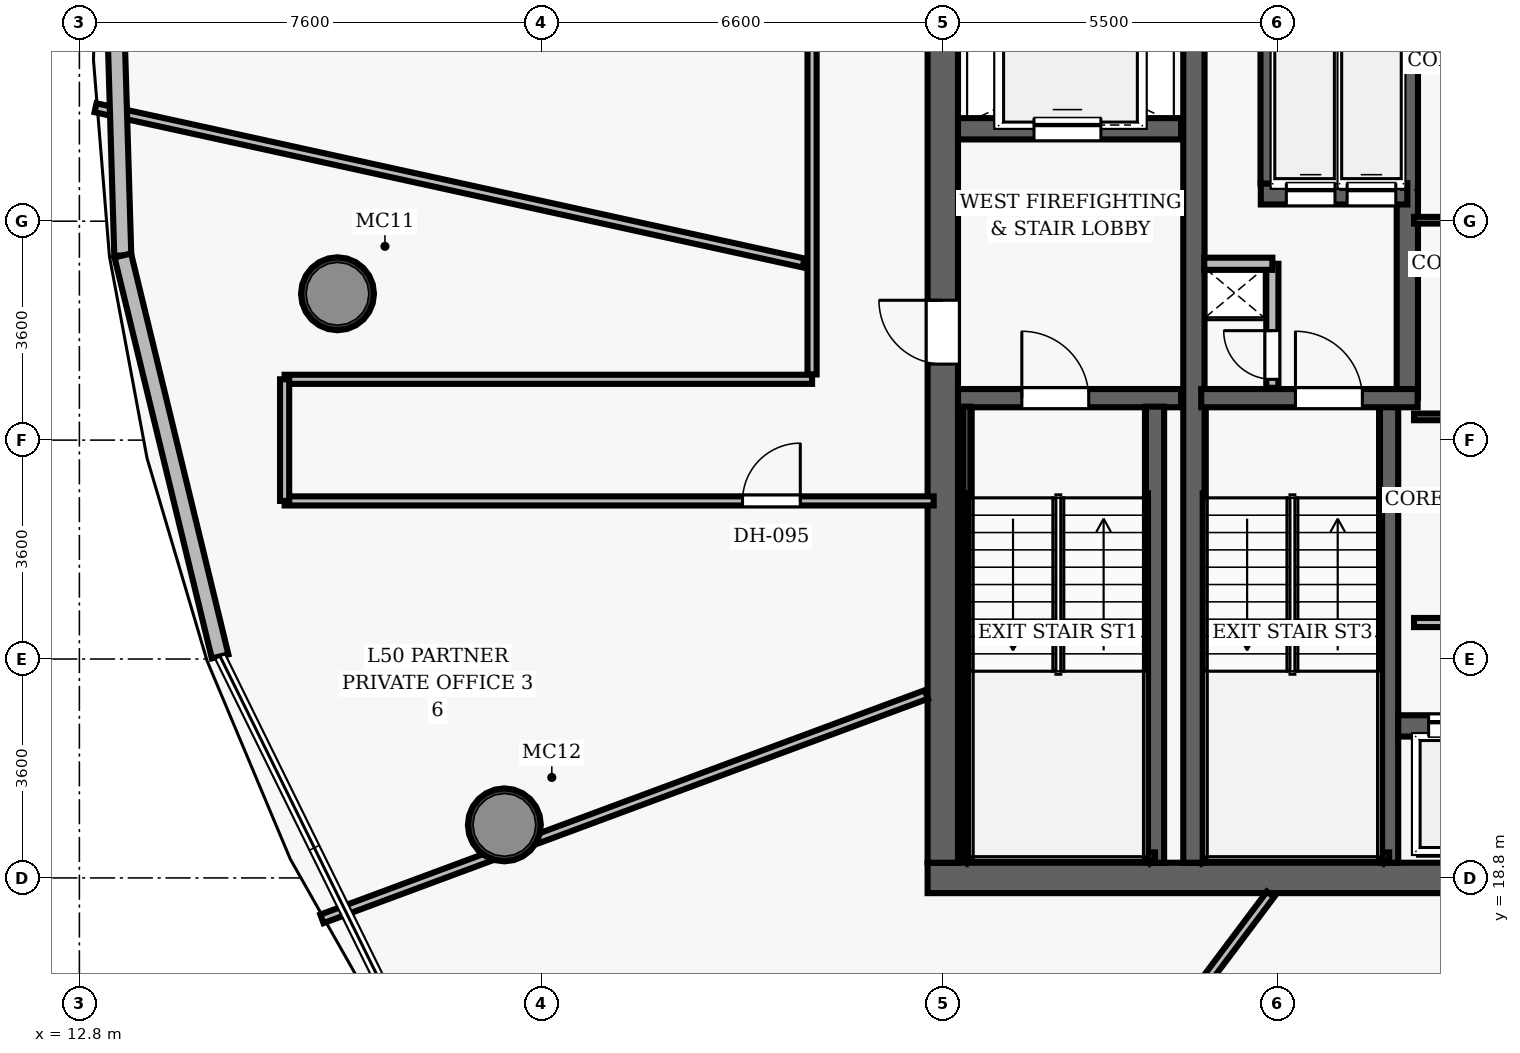
"""IFC4 building model, lengths in metres.
Left out: names, types, materials, properties, quantities, classifications, styles, units other than length and angle.
Written with IfcOpenShell. Run it as: python <this file> out.ifc"""

import sys

from ifc_helpers import new_model, si_unit, direction, frame, frame_2d, origin, origin_2d, place, context, subcontext, project, spatial, rectangle, hollow_circle, extrude, element, fill, save


model = new_model("IFC4")
c1 = context("Model", 3, precision=1e-05, world=origin(), true_north=direction((0.0, 1.0)))
c2 = subcontext(c1, "Body", "Model", "MODEL_VIEW")
j1 = project(units=[si_unit("LENGTHUNIT", "METRE"), si_unit("PLANEANGLEUNIT", "RADIAN")], contexts=[c1])
p1 = place(None, origin())
s1 = spatial("IfcSite", under=j1, at=p1, CompositionType="ELEMENT")
p2 = place(p1, origin())
s2 = spatial("IfcBuilding", under=s1, at=p2, CompositionType="ELEMENT")
p3 = place(p2, frame((0.0, 0.0, 198.15)))
s3 = spatial("IfcBuildingStorey", under=s2, at=p3, CompositionType="ELEMENT", Elevation=198.15)
p4 = place(p3, frame((26.75, 18.8, 0.0), z_axis=(0.0, 0.0, 1.0), x_axis=(1.0, 0.0, 0.0)))
e1 = element("IfcWall", 1, at=p4, inside=s3, PredefinedType="SHEAR", context=c2, shape_type="SweptSolid", body=[
    extrude(rectangle(XDim=22.5, YDim=0.5, at=frame_2d((11.25, 0.0))), origin(), (0.0, 0.0, 1.0), 3.85),
])
p5 = place(p4, frame((14.47, 0.0, 0.0)))
e2 = element("IfcOpeningElement", 2, at=p5, cuts=e1, PredefinedType="OPENING", context=c2, shape_type="SweptSolid", body=[
    extrude(rectangle(XDim=1.05, YDim=2.15, at=frame_2d((0.525, 1.075))), frame((0.0, 0.26, 0.0), z_axis=(0.0, -1.0, 0.0), x_axis=(1.0, 0.0, 0.0)), (0.0, 0.0, 1.0), 0.52),
])
p6 = place(p3, frame((27.0, 19.05, 0.0), z_axis=(0.0, 0.0, 1.0), x_axis=(0.0, 1.0, 0.0)))
e3 = element("IfcWall", 3, at=p6, inside=s3, PredefinedType="SHEAR", context=c2, shape_type="SweptSolid", body=[
    extrude(rectangle(XDim=13.9, YDim=0.5, at=frame_2d((6.95, 0.0))), origin(), (0.0, 0.0, 1.0), 3.85),
])
p7 = place(p6, frame((8.2, 0.0, 0.0)))
e4 = element("IfcOpeningElement", 4, at=p7, cuts=e3, PredefinedType="OPENING", context=c2, shape_type="SweptSolid", body=[
    extrude(rectangle(XDim=1.05, YDim=2.15, at=frame_2d((0.525, 1.075))), frame((0.0, 0.26, 0.0), z_axis=(0.0, -1.0, 0.0), x_axis=(1.0, 0.0, 0.0)), (0.0, 0.0, 1.0), 0.52),
])
p8 = place(p3, frame((31.13, 19.05, 0.0), z_axis=(0.0, 0.0, 1.0), x_axis=(0.0, 1.0, 0.0)))
e5 = element("IfcWall", 5, at=p8, inside=s3, PredefinedType="SHEAR", context=c2, shape_type="SweptSolid", body=[
    extrude(rectangle(XDim=13.9, YDim=0.35, at=frame_2d((6.95, 0.0))), origin(), (0.0, 0.0, 1.0), 3.85),
])
for number, where, z_axis, x_axis in (
    (6, (17.045, 28.406, 0.0), (0.0, 0.0, 1.0), (1.0, 0.0, 0.0)),
    (7, (19.79, 19.673, 0.0), (0.0, 0.0, 1.0), (1.0, 0.0, 0.0)),
):
    element("IfcColumn", number, at=place(p3, frame(where, z_axis=z_axis, x_axis=x_axis)), inside=s3, PredefinedType="COLUMN", context=c2, shape_type="SweptSolid", body=[
        extrude(hollow_circle(Radius=0.6, WallThickness=0.05, at=origin_2d()), origin(), (0.0, 0.0, 1.0), 3.85),
    ])
p9 = place(p3, frame((27.25, 26.69, 0.0), z_axis=(0.0, 0.0, 1.0), x_axis=(1.0, 0.0, 0.0)))
e8 = element("IfcWall", 8, at=p9, inside=s3, PredefinedType="SHEAR", context=c2, shape_type="SweptSolid", body=[
    extrude(rectangle(XDim=3.67, YDim=0.3, at=frame_2d((1.835, 0.0))), origin(), (0.0, 0.0, 1.0), 3.85),
])
p10 = place(p9, frame((1.05, 0.0, 0.0)))
e9 = element("IfcOpeningElement", 9, at=p10, cuts=e8, PredefinedType="OPENING", context=c2, shape_type="SweptSolid", body=[
    extrude(rectangle(XDim=1.1, YDim=2.15, at=frame_2d((0.55, 1.075))), frame((0.0, 0.16, 0.0), z_axis=(0.0, -1.0, 0.0), x_axis=(1.0, 0.0, 0.0)), (0.0, 0.0, 1.0), 0.32),
])
p11 = place(p3, frame((30.49, 19.05, 0.0), z_axis=(0.0, 0.0, 1.0), x_axis=(0.0, 1.0, 0.0)))
e10 = element("IfcWall", 10, at=p11, inside=s3, PredefinedType="SHEAR", context=c2, shape_type="SweptSolid", body=[
    extrude(rectangle(XDim=7.5, YDim=0.3, at=frame_2d((3.75, 0.0))), origin(), (0.0, 0.0, 1.0), 3.85),
])
p12 = place(p3, frame((27.395, 19.1, 0.0), z_axis=(0.0, 0.0, 1.0), x_axis=(0.0, 1.0, 0.0)))
e11 = element("IfcWall", 11, at=p12, inside=s3, PredefinedType="SHEAR", context=c2, shape_type="SweptSolid", body=[
    extrude(rectangle(XDim=7.45, YDim=0.12, at=frame_2d((3.725, 0.0))), origin(), (0.0, 0.0, 1.0), 3.85),
])
p13 = place(p3, frame((27.395, 19.16, 0.0), z_axis=(0.0, 0.0, 1.0), x_axis=(1.0, 0.0, 0.0)))
e12 = element("IfcWall", 12, at=p13, inside=s3, PredefinedType="SHEAR", context=c2, shape_type="SweptSolid", body=[
    extrude(rectangle(XDim=3.095, YDim=0.12, at=frame_2d((1.547, 0.0))), origin(), (0.0, 0.0, 1.0), 3.85),
])
p14 = place(p3, frame((27.25, 31.12, 0.0), z_axis=(0.0, 0.0, 1.0), x_axis=(1.0, 0.0, 0.0)))
e13 = element("IfcWall", 13, at=p14, inside=s3, PredefinedType="SHEAR", context=c2, shape_type="SweptSolid", body=[
    extrude(rectangle(XDim=3.67, YDim=0.35, at=frame_2d((1.835, 0.0))), origin(), (0.0, 0.0, 1.0), 3.035),
])
p15 = place(p14, frame((1.25, 0.0, 0.0)))
e14 = element("IfcOpeningElement", 14, at=p15, cuts=e13, PredefinedType="OPENING", context=c2, shape_type="SweptSolid", body=[
    extrude(rectangle(XDim=1.1, YDim=2.15, at=frame_2d((0.55, 1.075))), frame((0.0, 0.185, 0.0), z_axis=(0.0, -1.0, 0.0), x_axis=(1.0, 0.0, 0.0)), (0.0, 0.0, 1.0), 0.37),
])
p16 = place(p3, frame((34.34, 19.05, 0.0), z_axis=(0.0, 0.0, 1.0), x_axis=(0.0, 1.0, 0.0)))
e15 = element("IfcWall", 15, at=p16, inside=s3, PredefinedType="SHEAR", context=c2, shape_type="SweptSolid", body=[
    extrude(rectangle(XDim=7.5, YDim=0.3, at=frame_2d((3.75, 0.0))), origin(), (0.0, 0.0, 1.0), 3.85),
])
p17 = place(p3, frame((34.64, 26.69, 0.0), z_axis=(0.0, 0.0, 1.0), x_axis=(0.0, 1.0, 0.0)))
e16 = element("IfcWall", 16, at=p17, inside=s3, PredefinedType="SHEAR", context=c2, shape_type="SweptSolid", body=[
    extrude(rectangle(XDim=6.26, YDim=0.35, at=frame_2d((3.13, 0.0))), origin(), (0.0, 0.0, 1.0), 3.85),
])
p18 = place(p3, frame((31.25, 26.69, 0.0), z_axis=(0.0, 0.0, 1.0), x_axis=(1.0, 0.0, 0.0)))
e17 = element("IfcWall", 17, at=p18, inside=s3, PredefinedType="SHEAR", context=c2, shape_type="SweptSolid", body=[
    extrude(rectangle(XDim=3.56, YDim=0.3, at=frame_2d((1.78, 0.0))), origin(), (0.0, 0.0, 1.0), 3.85),
])
p19 = place(p18, frame((1.55, 0.0, 0.0)))
e18 = element("IfcOpeningElement", 18, at=p19, cuts=e17, PredefinedType="OPENING", context=c2, shape_type="SweptSolid", body=[
    extrude(rectangle(XDim=1.1, YDim=2.15, at=frame_2d((0.55, 1.075))), frame((0.0, 0.16, 0.0), z_axis=(0.0, -1.0, 0.0), x_axis=(1.0, 0.0, 0.0)), (0.0, 0.0, 1.0), 0.32),
])
p20 = place(p3, frame((31.3, 19.16, 0.0), z_axis=(0.0, 0.0, 1.0), x_axis=(1.0, 0.0, 0.0)))
e19 = element("IfcWall", 19, at=p20, inside=s3, PredefinedType="SHEAR", context=c2, shape_type="SweptSolid", body=[
    extrude(rectangle(XDim=3.04, YDim=0.12, at=frame_2d((1.52, 0.0))), origin(), (0.0, 0.0, 1.0), 3.85),
])
p21 = place(p3, frame((32.23, 30.05, 0.0), z_axis=(0.0, 0.0, 1.0), x_axis=(1.0, 0.0, 0.0)))
e20 = element("IfcWall", 20, at=p21, inside=s3, PredefinedType="SHEAR", context=c2, shape_type="SweptSolid", body=[
    extrude(rectangle(XDim=2.41, YDim=0.35, at=frame_2d((1.205, 0.0))), origin(), (0.0, 0.0, 1.0), 3.035),
])
p22 = place(p21, frame((0.42, 0.0, 0.0)))
e21 = element("IfcOpeningElement", 21, at=p22, cuts=e20, PredefinedType="OPENING", context=c2, shape_type="SweptSolid", body=[
    extrude(rectangle(XDim=0.8, YDim=2.15, at=frame_2d((0.4, 1.075))), frame((0.0, 0.185, 0.0), z_axis=(0.0, -1.0, 0.0), x_axis=(1.0, 0.0, 0.0)), (0.0, 0.0, 1.0), 0.37),
])
p23 = place(p21, frame((1.42, 0.0, 0.0)))
e22 = element("IfcOpeningElement", 22, at=p23, cuts=e20, PredefinedType="OPENING", context=c2, shape_type="SweptSolid", body=[
    extrude(rectangle(XDim=0.8, YDim=2.15, at=frame_2d((0.4, 1.075))), frame((0.0, 0.185, 0.0), z_axis=(0.0, -1.0, 0.0), x_axis=(1.0, 0.0, 0.0)), (0.0, 0.0, 1.0), 0.37),
])
p24 = place(p3, frame((32.4, 30.22, 0.0), z_axis=(0.0, 0.0, 1.0), x_axis=(0.0, 1.0, 0.0)))
e23 = element("IfcWall", 23, at=p24, inside=s3, PredefinedType="SHEAR", context=c2, shape_type="SweptSolid", body=[
    extrude(rectangle(XDim=2.73, YDim=0.35, at=frame_2d((1.365, 0.0))), origin(), (0.0, 0.0, 1.0), 3.035),
])
p25 = place(p3, frame((32.42, 26.86, 0.0), z_axis=(0.0, 0.0, 1.0), x_axis=(0.0, 1.0, 0.0)))
e24 = element("IfcWall", 24, at=p25, inside=s3, PredefinedType="PARTITIONING", context=c2, shape_type="SweptSolid", body=[
    extrude(rectangle(XDim=2.04, YDim=0.2, at=frame_2d((1.02, 0.0))), origin(), (0.0, 0.0, 1.0), 3.035),
])
p26 = place(p25, frame((0.14, 0.0, 0.0)))
e25 = element("IfcOpeningElement", 25, at=p26, cuts=e24, PredefinedType="OPENING", context=c2, shape_type="SweptSolid", body=[
    extrude(rectangle(XDim=0.8, YDim=2.05, at=frame_2d((0.4, 1.025))), frame((0.0, 0.11, 0.0), z_axis=(0.0, -1.0, 0.0), x_axis=(1.0, 0.0, 0.0)), (0.0, 0.0, 1.0), 0.22),
])
p27 = place(p3, frame((31.3, 28.9, 0.0), z_axis=(0.0, 0.0, 1.0), x_axis=(1.0, 0.0, 0.0)))
e26 = element("IfcWall", 26, at=p27, inside=s3, PredefinedType="PARTITIONING", context=c2, shape_type="SweptSolid", body=[
    extrude(rectangle(XDim=1.12, YDim=0.2, at=frame_2d((0.56, 0.0))), origin(), (0.0, 0.0, 1.0), 3.035),
])
p28 = place(p3, frame((34.49, 21.3, 0.0), z_axis=(0.0, 0.0, 1.0), x_axis=(1.0, 0.0, 0.0)))
e27 = element("IfcWall", 27, at=p28, inside=s3, PredefinedType="SHEAR", context=c2, shape_type="SweptSolid", body=[
    extrude(rectangle(XDim=6.68, YDim=0.35, at=frame_2d((3.34, 0.0))), origin(), (0.0, 0.0, 1.0), 3.035),
])
p29 = place(p28, frame((0.5, 0.0, 0.0)))
e28 = element("IfcOpeningElement", 28, at=p29, cuts=e27, PredefinedType="OPENING", context=c2, shape_type="SweptSolid", body=[
    extrude(rectangle(XDim=0.9, YDim=2.15, at=frame_2d((0.45, 1.075))), frame((0.0, 0.185, 0.0), z_axis=(0.0, -1.0, 0.0), x_axis=(1.0, 0.0, 0.0)), (0.0, 0.0, 1.0), 0.37),
])
p30 = place(p28, frame((2.58, 0.0, 0.0)))
e29 = element("IfcOpeningElement", 29, at=p30, cuts=e27, PredefinedType="OPENING", context=c2, shape_type="SweptSolid", body=[
    extrude(rectangle(XDim=0.9, YDim=2.15, at=frame_2d((0.45, 1.075))), frame((0.0, 0.185, 0.0), z_axis=(0.0, -1.0, 0.0), x_axis=(1.0, 0.0, 0.0)), (0.0, 0.0, 1.0), 0.37),
])
p31 = place(p28, frame((4.66, 0.0, 0.0)))
e30 = element("IfcOpeningElement", 30, at=p31, cuts=e27, PredefinedType="OPENING", context=c2, shape_type="SweptSolid", body=[
    extrude(rectangle(XDim=0.9, YDim=2.15, at=frame_2d((0.45, 1.075))), frame((0.0, 0.185, 0.0), z_axis=(0.0, -1.0, 0.0), x_axis=(1.0, 0.0, 0.0)), (0.0, 0.0, 1.0), 0.37),
])
p32 = place(p3, frame((34.75, 23.0, 0.0), z_axis=(0.0, 0.0, 1.0), x_axis=(1.0, 0.0, 0.0)))
e31 = element("IfcWall", 31, at=p32, inside=s3, PredefinedType="PARTITIONING", context=c2, shape_type="SweptSolid", body=[
    extrude(rectangle(XDim=6.25, YDim=0.15, at=frame_2d((3.125, 0.0))), origin(), (0.0, 0.0, 1.0), 3.035),
])
for number, where, z_axis, x_axis in (
    (32, (34.75, 26.382, 0.0), (0.0, 0.0, 1.0), (1.0, 0.0, 0.0)),
    (33, (34.75, 29.616, 0.0), (0.0, 0.0, 1.0), (1.0, 0.0, 0.0)),
):
    element("IfcWall", number, at=place(p3, frame(where, z_axis=z_axis, x_axis=x_axis)), inside=s3, PredefinedType="PARTITIONING", context=c2, shape_type="SweptSolid", body=[
        extrude(rectangle(XDim=6.25, YDim=0.11, at=frame_2d((3.125, 0.0))), origin(), (0.0, 0.0, 1.0), 3.035),
    ])
p33 = place(p3, frame((24.85, 27.08, 0.0), z_axis=(0.0, 0.0, 1.0), x_axis=(0.0, 1.0, 0.0)))
e34 = element("IfcWall", 34, at=p33, inside=s3, PredefinedType="PARTITIONING", context=c2, shape_type="SweptSolid", body=[
    extrude(rectangle(XDim=8.12, YDim=0.15, at=frame_2d((4.06, 0.0))), origin(), (0.0, 0.0, 1.0), 3.035),
])
p34 = place(p3, frame((16.175, 27.0, 0.0), z_axis=(0.0, 0.0, 1.0), x_axis=(1.0, 0.0, 0.0)))
e35 = element("IfcWall", 35, at=p34, inside=s3, PredefinedType="PARTITIONING", context=c2, shape_type="SweptSolid", body=[
    extrude(rectangle(XDim=8.675, YDim=0.15, at=frame_2d((4.337, 0.0))), origin(), (0.0, 0.0, 1.0), 3.035),
])
p35 = place(p3, frame((16.175, 25.0, 0.0), z_axis=(0.0, 0.0, 1.0), x_axis=(1.0, 0.0, 0.0)))
e36 = element("IfcWall", 36, at=p35, inside=s3, PredefinedType="PARTITIONING", context=c2, shape_type="SweptSolid", body=[
    extrude(rectangle(XDim=10.675, YDim=0.15, at=frame_2d((5.337, 0.0))), origin(), (0.0, 0.0, 1.0), 3.035),
])
p36 = place(p35, frame((7.531, 0.0, 0.0)))
e37 = element("IfcOpeningElement", 37, at=p36, cuts=e36, PredefinedType="OPENING", context=c2, shape_type="SweptSolid", body=[
    extrude(rectangle(XDim=0.95, YDim=2.15, at=frame_2d((0.475, 1.075))), frame((0.0, 0.085, 0.0), z_axis=(0.0, -1.0, 0.0), x_axis=(1.0, 0.0, 0.0)), (0.0, 0.0, 1.0), 0.17),
])
p37 = place(p3, frame((16.175, 25.0, 0.0), z_axis=(0.0, 0.0, 1.0), x_axis=(0.0, 1.0, 0.0)))
e38 = element("IfcWall", 38, at=p37, inside=s3, PredefinedType="PARTITIONING", context=c2, shape_type="SweptSolid", body=[
    extrude(rectangle(XDim=2.0, YDim=0.15, at=frame_2d((1.0, 0.0))), origin(), (0.0, 0.0, 1.0), 3.035),
])
p38 = place(p3, frame((24.71, 28.913, 0.0), z_axis=(0.0, 0.0, 1.0), x_axis=(-0.976806128217, 0.21412563573, 0.0)))
e39 = element("IfcWall", 39, at=p38, inside=s3, PredefinedType="PARTITIONING", context=c2, shape_type="SweptSolid", body=[
    extrude(rectangle(XDim=11.92, YDim=0.15, at=frame_2d((5.96, 0.0))), origin(), (0.0, 0.0, 1.0), 3.035),
])
p39 = place(p3, frame((26.73, 21.817, 0.0), z_axis=(0.0, 0.0, 1.0), x_axis=(-0.937501901357, -0.347980150227, 0.0)))
e40 = element("IfcWall", 40, at=p39, inside=s3, PredefinedType="PARTITIONING", context=c2, shape_type="SweptSolid", body=[
    extrude(rectangle(XDim=10.604, YDim=0.15, at=frame_2d((5.302, 0.0))), origin(), (0.0, 0.0, 1.0), 3.035),
])
p40 = place(p3, frame((32.389, 18.53, 0.0), z_axis=(0.0, 0.0, 1.0), x_axis=(-0.60053784947, -0.799596330253, 0.0)))
e41 = element("IfcWall", 41, at=p40, inside=s3, PredefinedType="PARTITIONING", context=c2, shape_type="SweptSolid", body=[
    extrude(rectangle(XDim=12.271, YDim=0.15, at=frame_2d((6.135, 0.0))), origin(), (0.0, 0.0, 1.0), 3.035),
])
p41 = place(p3, frame((13.514, 29.036, 0.0), z_axis=(0.0, 0.0, 1.0), x_axis=(-0.030035086117, 0.999548845031, 0.0)))
e42 = element("IfcWall", 42, at=p41, inside=s3, PredefinedType="SOLIDWALL", context=c2, shape_type="SweptSolid", body=[
    extrude(rectangle(XDim=6.227, YDim=0.28, at=frame_2d((3.113, 0.0))), origin(), (0.0, 0.0, 1.0), 3.62),
])
p42 = place(p3, frame((15.115, 22.443, 0.0), z_axis=(0.0, 0.0, 1.0), x_axis=(-0.235917229787, 0.971773152896, 0.0)))
e43 = element("IfcWall", 43, at=p42, inside=s3, PredefinedType="SOLIDWALL", context=c2, shape_type="SweptSolid", body=[
    extrude(rectangle(XDim=6.784, YDim=0.28, at=frame_2d((3.392, 0.0))), origin(), (0.0, 0.0, 1.0), 3.62),
])
p43 = place(p10, origin())
e44 = element("IfcDoor", 44, at=p43, inside=s3, OperationType="SINGLE_SWING_LEFT", PredefinedType="DOOR", context=c2, shape_type="SweptSolid", body=[
    extrude(rectangle(XDim=1.1, YDim=2.15, at=frame_2d((0.55, 1.075))), frame((0.0, 0.025, 0.0), z_axis=(0.0, -1.0, 0.0), x_axis=(1.0, 0.0, 0.0)), (0.0, 0.0, 1.0), 0.05),
])
fill(e9, e44)
p44 = place(p7, origin())
e45 = element("IfcDoor", 45, at=p44, inside=s3, OperationType="SINGLE_SWING_RIGHT", PredefinedType="DOOR", context=c2, shape_type="SweptSolid", body=[
    extrude(rectangle(XDim=1.05, YDim=2.15, at=frame_2d((0.525, 1.075))), frame((0.0, 0.025, 0.0), z_axis=(0.0, -1.0, 0.0), x_axis=(1.0, 0.0, 0.0)), (0.0, 0.0, 1.0), 0.05),
])
fill(e4, e45)
p45 = place(p19, origin())
e46 = element("IfcDoor", 46, at=p45, inside=s3, OperationType="SINGLE_SWING_LEFT", PredefinedType="DOOR", context=c2, shape_type="SweptSolid", body=[
    extrude(rectangle(XDim=1.1, YDim=2.15, at=frame_2d((0.55, 1.075))), frame((0.0, 0.025, 0.0), z_axis=(0.0, -1.0, 0.0), x_axis=(1.0, 0.0, 0.0)), (0.0, 0.0, 1.0), 0.05),
])
fill(e18, e46)
p46 = place(p26, origin())
e47 = element("IfcDoor", 47, at=p46, inside=s3, OperationType="SINGLE_SWING_RIGHT", PredefinedType="DOOR", context=c2, shape_type="SweptSolid", body=[
    extrude(rectangle(XDim=0.8, YDim=2.05, at=frame_2d((0.4, 1.025))), frame((0.0, 0.025, 0.0), z_axis=(0.0, -1.0, 0.0), x_axis=(1.0, 0.0, 0.0)), (0.0, 0.0, 1.0), 0.05),
])
fill(e25, e47)
p47 = place(p36, origin())
e48 = element("IfcDoor", 48, at=p47, inside=s3, OperationType="SINGLE_SWING_RIGHT", PredefinedType="DOOR", context=c2, shape_type="SweptSolid", body=[
    extrude(rectangle(XDim=0.95, YDim=2.15, at=frame_2d((0.475, 1.075))), frame((0.0, 0.025, 0.0), z_axis=(0.0, -1.0, 0.0), x_axis=(1.0, 0.0, 0.0)), (0.0, 0.0, 1.0), 0.05),
])
fill(e37, e48)
p48 = place(p29, origin())
e49 = element("IfcDoor", 49, at=p48, inside=s3, OperationType="SLIDING_TO_LEFT", PredefinedType="DOOR", context=c2, shape_type="SweptSolid", body=[
    extrude(rectangle(XDim=0.9, YDim=2.15, at=frame_2d((0.45, 1.075))), frame((0.0, 0.025, 0.0), z_axis=(0.0, -1.0, 0.0), x_axis=(1.0, 0.0, 0.0)), (0.0, 0.0, 1.0), 0.05),
])
fill(e28, e49)
p49 = place(p15, origin())
e50 = element("IfcDoor", 50, at=p49, inside=s3, OperationType="SLIDING_TO_LEFT", PredefinedType="DOOR", context=c2, shape_type="SweptSolid", body=[
    extrude(rectangle(XDim=1.1, YDim=2.15, at=frame_2d((0.55, 1.075))), frame((0.0, 0.025, 0.0), z_axis=(0.0, -1.0, 0.0), x_axis=(1.0, 0.0, 0.0)), (0.0, 0.0, 1.0), 0.05),
])
fill(e14, e50)
p50 = place(p22, origin())
e51 = element("IfcDoor", 51, at=p50, inside=s3, OperationType="SLIDING_TO_LEFT", PredefinedType="DOOR", context=c2, shape_type="SweptSolid", body=[
    extrude(rectangle(XDim=0.8, YDim=2.15, at=frame_2d((0.4, 1.075))), frame((0.0, 0.025, 0.0), z_axis=(0.0, -1.0, 0.0), x_axis=(1.0, 0.0, 0.0)), (0.0, 0.0, 1.0), 0.05),
])
fill(e21, e51)
p51 = place(p23, origin())
e52 = element("IfcDoor", 52, at=p51, inside=s3, OperationType="SLIDING_TO_LEFT", PredefinedType="DOOR", context=c2, shape_type="SweptSolid", body=[
    extrude(rectangle(XDim=0.8, YDim=2.15, at=frame_2d((0.4, 1.075))), frame((0.0, 0.025, 0.0), z_axis=(0.0, -1.0, 0.0), x_axis=(1.0, 0.0, 0.0)), (0.0, 0.0, 1.0), 0.05),
])
fill(e22, e52)
save(model, sys.argv[1])
